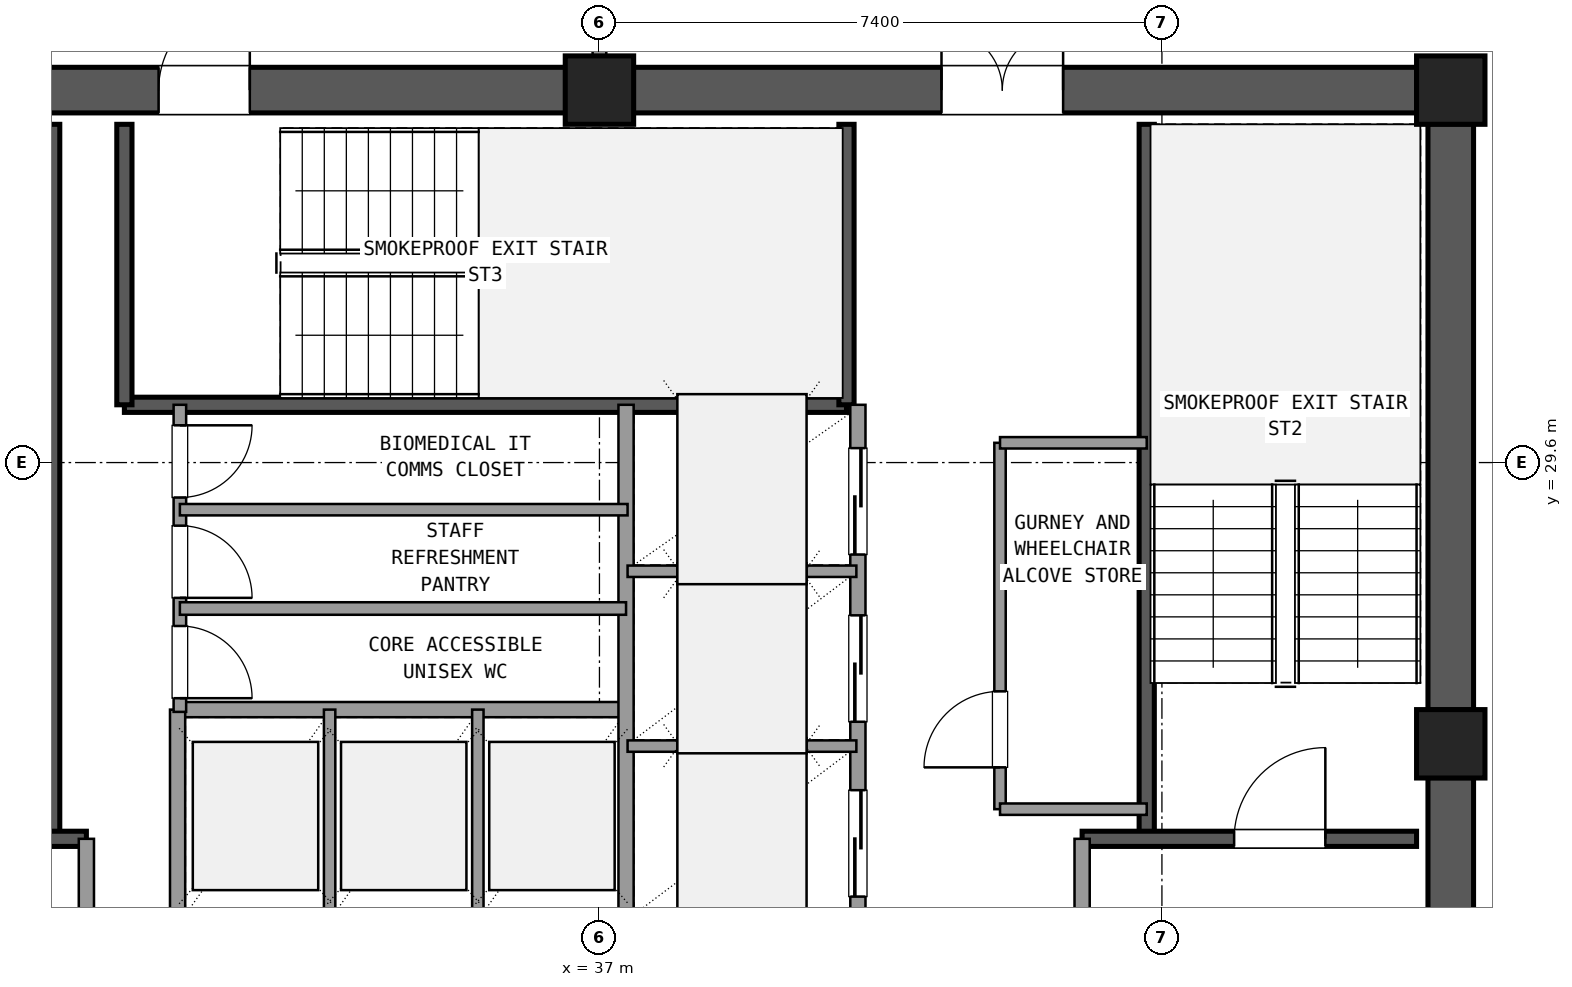
"""IFC4 building model, lengths in metres.
Left out: names, types, materials, properties, quantities, classifications, styles, units other than length and angle.
Written with IfcOpenShell. Run it as: python <this file> out.ifc"""

import sys

from ifc_helpers import new_model, si_unit, direction, frame, frame_2d, origin, origin_2d, place, context, subcontext, project, spatial, rectangle, extrude, element, fill, save


model = new_model("IFC4")
c1 = context("Model", 3, precision=1e-05, world=origin(), true_north=direction((0.0, 1.0)))
c2 = subcontext(c1, "Body", "Model", "MODEL_VIEW")
j1 = project(units=[si_unit("LENGTHUNIT", "METRE"), si_unit("PLANEANGLEUNIT", "RADIAN")], contexts=[c1])
p1 = place(None, origin())
s1 = spatial("IfcSite", under=j1, at=p1, CompositionType="ELEMENT")
p2 = place(p1, origin())
s2 = spatial("IfcBuilding", under=s1, at=p2, CompositionType="ELEMENT")
p3 = place(p2, frame((0.0, 0.0, 242.82)))
s3 = spatial("IfcBuildingStorey", under=s2, at=p3, CompositionType="ELEMENT", Elevation=242.82)
for number, where, z_axis, x_axis in (
    (1, (48.2, 25.9, 0.0), (0.0, 0.0, 1.0), (1.0, 0.0, 0.0)),
    (2, (48.2, 34.5, 0.0), (0.0, 0.0, 1.0), (1.0, 0.0, 0.0)),
    (3, (37.0, 34.5, 0.0), (0.0, 0.0, 1.0), (1.0, 0.0, 0.0)),
):
    element("IfcColumn", number, at=place(p3, frame(where, z_axis=z_axis, x_axis=x_axis)), inside=s3, PredefinedType="COLUMN", context=c2, shape_type="SweptSolid", body=[
        extrude(rectangle(XDim=0.9, YDim=0.9, at=origin_2d()), origin(), (0.0, 0.0, 1.0), 3.6),
    ])
p4 = place(p3, frame((48.2, 17.745, 0.0), z_axis=(0.0, 0.0, 1.0), x_axis=(0.0, 1.0, 0.0)))
e4 = element("IfcWall", 4, at=p4, inside=s3, PredefinedType="SHEAR", context=c2, shape_type="SweptSolid", body=[
    extrude(rectangle(XDim=7.71, YDim=0.6, at=frame_2d((3.855, 0.0))), origin(), (0.0, 0.0, 1.0), 3.32),
])
p5 = place(p4, frame((4.305, 0.0, 0.0)))
e5 = element("IfcOpeningElement", 5, at=p5, cuts=e4, PredefinedType="OPENING", context=c2, shape_type="SweptSolid", body=[
    extrude(rectangle(XDim=1.2, YDim=2.15, at=frame_2d((0.6, 1.075))), frame((0.0, 0.31, 0.0), z_axis=(0.0, -1.0, 0.0), x_axis=(1.0, 0.0, 0.0)), (0.0, 0.0, 1.0), 0.62),
])
p6 = place(p3, frame((48.2, 26.345, 0.0), z_axis=(0.0, 0.0, 1.0), x_axis=(0.0, 1.0, 0.0)))
e6 = element("IfcWall", 6, at=p6, inside=s3, PredefinedType="SHEAR", context=c2, shape_type="SweptSolid", body=[
    extrude(rectangle(XDim=7.71, YDim=0.6, at=frame_2d((3.855, 0.0))), origin(), (0.0, 0.0, 1.0), 3.32),
])
p7 = place(p3, frame((47.755, 34.5, 0.0), z_axis=(0.0, 0.0, 1.0), x_axis=(-1.0, 0.0, 0.0)))
e7 = element("IfcWall", 7, at=p7, inside=s3, PredefinedType="SHEAR", context=c2, shape_type="SweptSolid", body=[
    extrude(rectangle(XDim=10.31, YDim=0.6, at=frame_2d((5.155, 0.0))), origin(), (0.0, 0.0, 1.0), 3.32),
])
p8 = place(p7, frame((4.655, 0.0, 0.0)))
e8 = element("IfcOpeningElement", 8, at=p8, cuts=e7, PredefinedType="OPENING", context=c2, shape_type="SweptSolid", body=[
    extrude(rectangle(XDim=1.6, YDim=2.2, at=frame_2d((0.8, 1.1))), frame((0.0, 0.31, 0.0), z_axis=(0.0, -1.0, 0.0), x_axis=(1.0, 0.0, 0.0)), (0.0, 0.0, 1.0), 0.62),
])
p9 = place(p3, frame((36.555, 34.5, 0.0), z_axis=(0.0, 0.0, 1.0), x_axis=(-1.0, 0.0, 0.0)))
e9 = element("IfcWall", 9, at=p9, inside=s3, PredefinedType="SHEAR", context=c2, shape_type="SweptSolid", body=[
    extrude(rectangle(XDim=10.31, YDim=0.6, at=frame_2d((5.155, 0.0))), origin(), (0.0, 0.0, 1.0), 3.32),
])
p10 = place(p9, frame((4.155, 0.0, 0.0)))
e10 = element("IfcOpeningElement", 10, at=p10, cuts=e9, PredefinedType="OPENING", context=c2, shape_type="SweptSolid", body=[
    extrude(rectangle(XDim=1.2, YDim=2.15, at=frame_2d((0.6, 1.075))), frame((0.0, 0.31, 0.0), z_axis=(0.0, -1.0, 0.0), x_axis=(1.0, 0.0, 0.0)), (0.0, 0.0, 1.0), 0.62),
])
p11 = place(p3, frame((29.8, 24.65, 0.0), z_axis=(0.0, 0.0, 1.0), x_axis=(0.0, 1.0, 0.0)))
e11 = element("IfcWall", 11, at=p11, inside=s3, PredefinedType="SHEAR", context=c2, shape_type="SweptSolid", body=[
    extrude(rectangle(XDim=9.4, YDim=0.2, at=frame_2d((4.7, 0.0))), origin(), (0.0, 0.0, 1.0), 3.32),
])
p12 = place(p3, frame((26.25, 24.65, 0.0), z_axis=(0.0, 0.0, 1.0), x_axis=(1.0, 0.0, 0.0)))
e12 = element("IfcWall", 12, at=p12, inside=s3, PredefinedType="SHEAR", context=c2, shape_type="SweptSolid", body=[
    extrude(rectangle(XDim=4.0, YDim=0.2, at=frame_2d((2.0, 0.0))), origin(), (0.0, 0.0, 1.0), 3.32),
])
p13 = place(p12, frame((1.0, 0.0, 0.0)))
e13 = element("IfcOpeningElement", 13, at=p13, cuts=e12, PredefinedType="OPENING", context=c2, shape_type="SweptSolid", body=[
    extrude(rectangle(XDim=1.2, YDim=2.15, at=frame_2d((0.6, 1.075))), frame((0.0, 0.11, 0.0), z_axis=(0.0, -1.0, 0.0), x_axis=(1.0, 0.0, 0.0)), (0.0, 0.0, 1.0), 0.22),
])
p14 = place(p3, frame((44.2, 24.65, 0.0), z_axis=(0.0, 0.0, 1.0), x_axis=(0.0, 1.0, 0.0)))
e14 = element("IfcWall", 14, at=p14, inside=s3, PredefinedType="SHEAR", context=c2, shape_type="SweptSolid", body=[
    extrude(rectangle(XDim=9.4, YDim=0.2, at=frame_2d((4.7, 0.0))), origin(), (0.0, 0.0, 1.0), 3.32),
])
p15 = place(p3, frame((43.35, 24.65, 0.0), z_axis=(0.0, 0.0, 1.0), x_axis=(1.0, 0.0, 0.0)))
e15 = element("IfcWall", 15, at=p15, inside=s3, PredefinedType="SHEAR", context=c2, shape_type="SweptSolid", body=[
    extrude(rectangle(XDim=4.4, YDim=0.2, at=frame_2d((2.2, 0.0))), origin(), (0.0, 0.0, 1.0), 3.32),
])
p16 = place(p15, frame((2.0, 0.0, 0.0)))
e16 = element("IfcOpeningElement", 16, at=p16, cuts=e15, PredefinedType="OPENING", context=c2, shape_type="SweptSolid", body=[
    extrude(rectangle(XDim=1.2, YDim=2.15, at=frame_2d((0.6, 1.075))), frame((0.0, 0.11, 0.0), z_axis=(0.0, -1.0, 0.0), x_axis=(1.0, 0.0, 0.0)), (0.0, 0.0, 1.0), 0.22),
])
p17 = place(p3, frame((30.75, 30.36, 0.0), z_axis=(0.0, 0.0, 1.0), x_axis=(1.0, 0.0, 0.0)))
e17 = element("IfcWall", 17, at=p17, inside=s3, PredefinedType="SHEAR", context=c2, shape_type="SweptSolid", body=[
    extrude(rectangle(XDim=9.5, YDim=0.2, at=frame_2d((4.75, 0.0))), origin(), (0.0, 0.0, 1.0), 3.32),
])
for number, where, z_axis, x_axis in (
    (18, (30.75, 30.36, 0.0), (0.0, 0.0, 1.0), (0.0, 1.0, 0.0)),
    (19, (40.25, 30.36, 0.0), (0.0, 0.0, 1.0), (0.0, 1.0, 0.0)),
):
    element("IfcWall", number, at=place(p3, frame(where, z_axis=z_axis, x_axis=x_axis)), inside=s3, PredefinedType="SHEAR", context=c2, shape_type="SweptSolid", body=[
        extrude(rectangle(XDim=3.69, YDim=0.2, at=frame_2d((1.845, 0.0))), origin(), (0.0, 0.0, 1.0), 3.32),
    ])
p18 = place(p3, frame((30.25, 17.75, 0.0), z_axis=(0.0, 0.0, 1.0), x_axis=(0.0, 1.0, 0.0)))
e20 = element("IfcWall", 20, at=p18, inside=s3, PredefinedType="SOLIDWALL", context=c2, shape_type="SweptSolid", body=[
    extrude(rectangle(XDim=6.9, YDim=0.2, at=frame_2d((3.45, 0.0))), origin(), (0.0, 0.0, 1.0), 2.61),
])
p19 = place(p18, frame((4.15, 0.0, 0.0)))
e21 = element("IfcOpeningElement", 21, at=p19, cuts=e20, PredefinedType="OPENING", context=c2, shape_type="SweptSolid", body=[
    extrude(rectangle(XDim=1.2, YDim=2.15, at=frame_2d((0.6, 1.075))), frame((0.0, 0.11, 0.0), z_axis=(0.0, -1.0, 0.0), x_axis=(1.0, 0.0, 0.0)), (0.0, 0.0, 1.0), 0.22),
])
p20 = place(p3, frame((43.35, 17.75, 0.0), z_axis=(0.0, 0.0, 1.0), x_axis=(0.0, 1.0, 0.0)))
e22 = element("IfcWall", 22, at=p20, inside=s3, PredefinedType="SOLIDWALL", context=c2, shape_type="SweptSolid", body=[
    extrude(rectangle(XDim=6.9, YDim=0.2, at=frame_2d((3.45, 0.0))), origin(), (0.0, 0.0, 1.0), 2.61),
])
p21 = place(p20, frame((4.15, 0.0, 0.0)))
e23 = element("IfcOpeningElement", 23, at=p21, cuts=e22, PredefinedType="OPENING", context=c2, shape_type="SweptSolid", body=[
    extrude(rectangle(XDim=1.2, YDim=2.15, at=frame_2d((0.6, 1.075))), frame((0.0, 0.11, 0.0), z_axis=(0.0, -1.0, 0.0), x_axis=(1.0, 0.0, 0.0)), (0.0, 0.0, 1.0), 0.22),
])
p22 = place(p3, frame((31.45, 26.35, 0.0), z_axis=(0.0, 0.0, 1.0), x_axis=(1.0, 0.0, 0.0)))
e24 = element("IfcWall", 24, at=p22, inside=s3, PredefinedType="SOLIDWALL", context=c2, shape_type="SweptSolid", body=[
    extrude(rectangle(XDim=5.9, YDim=0.2, at=frame_2d((2.95, 0.0))), origin(), (0.0, 0.0, 1.0), 2.61),
])
p23 = place(p3, frame((31.45, 23.54, 0.0), z_axis=(0.0, 0.0, 1.0), x_axis=(0.0, 1.0, 0.0)))
e25 = element("IfcWall", 25, at=p23, inside=s3, PredefinedType="SOLIDWALL", context=c2, shape_type="SweptSolid", body=[
    extrude(rectangle(XDim=2.81, YDim=0.2, at=frame_2d((1.405, 0.0))), origin(), (0.0, 0.0, 1.0), 2.61),
])
for number, where, z_axis, x_axis in (
    (26, (33.45, 23.54, 0.0), (0.0, 0.0, 1.0), (0.0, 1.0, 0.0)),
    (27, (35.4, 23.54, 0.0), (0.0, 0.0, 1.0), (0.0, 1.0, 0.0)),
):
    element("IfcWall", number, at=place(p3, frame(where, z_axis=z_axis, x_axis=x_axis)), inside=s3, PredefinedType="PARTITIONING", context=c2, shape_type="SweptSolid", body=[
        extrude(rectangle(XDim=2.81, YDim=0.15, at=frame_2d((1.405, 0.0))), origin(), (0.0, 0.0, 1.0), 2.61),
    ])
p24 = place(p3, frame((37.35, 23.54, 0.0), z_axis=(0.0, 0.0, 1.0), x_axis=(0.0, 1.0, 0.0)))
e28 = element("IfcWall", 28, at=p24, inside=s3, PredefinedType="SOLIDWALL", context=c2, shape_type="SweptSolid", body=[
    extrude(rectangle(XDim=6.82, YDim=0.2, at=frame_2d((3.41, 0.0))), origin(), (0.0, 0.0, 1.0), 2.61),
])
p25 = place(p3, frame((40.4, 23.54, 0.0), z_axis=(0.0, 0.0, 1.0), x_axis=(0.0, 1.0, 0.0)))
e29 = element("IfcWall", 29, at=p25, inside=s3, PredefinedType="SOLIDWALL", context=c2, shape_type="SweptSolid", body=[
    extrude(rectangle(XDim=6.82, YDim=0.2, at=frame_2d((3.41, 0.0))), origin(), (0.0, 0.0, 1.0), 2.61),
])
p26 = place(p25, frame((0.35, 0.0, 0.0)))
e30 = element("IfcOpeningElement", 30, at=p26, cuts=e29, PredefinedType="OPENING", context=c2, shape_type="SweptSolid", body=[
    extrude(rectangle(XDim=1.4, YDim=2.2, at=frame_2d((0.7, 1.1))), frame((0.0, 0.11, 0.0), z_axis=(0.0, -1.0, 0.0), x_axis=(1.0, 0.0, 0.0)), (0.0, 0.0, 1.0), 0.22),
])
p27 = place(p25, frame((2.65, 0.0, 0.0)))
e31 = element("IfcOpeningElement", 31, at=p27, cuts=e29, PredefinedType="OPENING", context=c2, shape_type="SweptSolid", body=[
    extrude(rectangle(XDim=1.4, YDim=2.2, at=frame_2d((0.7, 1.1))), frame((0.0, 0.11, 0.0), z_axis=(0.0, -1.0, 0.0), x_axis=(1.0, 0.0, 0.0)), (0.0, 0.0, 1.0), 0.22),
])
p28 = place(p25, frame((4.85, 0.0, 0.0)))
e32 = element("IfcOpeningElement", 32, at=p28, cuts=e29, PredefinedType="OPENING", context=c2, shape_type="SweptSolid", body=[
    extrude(rectangle(XDim=1.4, YDim=2.2, at=frame_2d((0.7, 1.1))), frame((0.0, 0.11, 0.0), z_axis=(0.0, -1.0, 0.0), x_axis=(1.0, 0.0, 0.0)), (0.0, 0.0, 1.0), 0.22),
])
for number, where, z_axis, x_axis in (
    (33, (37.37, 25.87, 0.0), (0.0, 0.0, 1.0), (1.0, 0.0, 0.0)),
    (34, (37.37, 28.17, 0.0), (0.0, 0.0, 1.0), (1.0, 0.0, 0.0)),
):
    element("IfcWall", number, at=place(p3, frame(where, z_axis=z_axis, x_axis=x_axis)), inside=s3, PredefinedType="PARTITIONING", context=c2, shape_type="SweptSolid", body=[
        extrude(rectangle(XDim=3.01, YDim=0.15, at=frame_2d((1.505, 0.0))), origin(), (0.0, 0.0, 1.0), 2.61),
    ])
p29 = place(p3, frame((42.27, 25.04, 0.0), z_axis=(0.0, 0.0, 1.0), x_axis=(0.0, 1.0, 0.0)))
e35 = element("IfcWall", 35, at=p29, inside=s3, PredefinedType="PARTITIONING", context=c2, shape_type="SweptSolid", body=[
    extrude(rectangle(XDim=4.82, YDim=0.15, at=frame_2d((2.41, 0.0))), origin(), (0.0, 0.0, 1.0), 2.61),
])
p30 = place(p29, frame((0.55, 0.0, 0.0)))
e36 = element("IfcOpeningElement", 36, at=p30, cuts=e35, PredefinedType="OPENING", context=c2, shape_type="SweptSolid", body=[
    extrude(rectangle(XDim=1.0, YDim=2.15, at=frame_2d((0.5, 1.075))), frame((0.0, 0.085, 0.0), z_axis=(0.0, -1.0, 0.0), x_axis=(1.0, 0.0, 0.0)), (0.0, 0.0, 1.0), 0.17),
])
for number, where, z_axis, x_axis in (
    (37, (42.27, 25.04, 0.0), (0.0, 0.0, 1.0), (1.0, 0.0, 0.0)),
    (38, (42.27, 29.86, 0.0), (0.0, 0.0, 1.0), (1.0, 0.0, 0.0)),
):
    element("IfcWall", number, at=place(p3, frame(where, z_axis=z_axis, x_axis=x_axis)), inside=s3, PredefinedType="PARTITIONING", context=c2, shape_type="SweptSolid", body=[
        extrude(rectangle(XDim=1.93, YDim=0.15, at=frame_2d((0.965, 0.0))), origin(), (0.0, 0.0, 1.0), 2.61),
    ])
p31 = place(p3, frame((31.48, 26.32, 0.0), z_axis=(0.0, 0.0, 1.0), x_axis=(0.0, 1.0, 0.0)))
e39 = element("IfcWall", 39, at=p31, inside=s3, PredefinedType="PLUMBINGWALL", context=c2, shape_type="SweptSolid", body=[
    extrude(rectangle(XDim=4.04, YDim=0.165, at=frame_2d((2.02, 0.0))), origin(), (0.0, 0.0, 1.0), 2.61),
])
p32 = place(p31, frame((0.18, 0.0, 0.0)))
e40 = element("IfcOpeningElement", 40, at=p32, cuts=e39, PredefinedType="OPENING", context=c2, shape_type="SweptSolid", body=[
    extrude(rectangle(XDim=0.95, YDim=2.1, at=frame_2d((0.475, 1.05))), frame((0.0, 0.093, 0.0), z_axis=(0.0, -1.0, 0.0), x_axis=(1.0, 0.0, 0.0)), (0.0, 0.0, 1.0), 0.185),
])
p33 = place(p31, frame((1.5, 0.0, 0.0)))
e41 = element("IfcOpeningElement", 41, at=p33, cuts=e39, PredefinedType="OPENING", context=c2, shape_type="SweptSolid", body=[
    extrude(rectangle(XDim=0.95, YDim=2.1, at=frame_2d((0.475, 1.05))), frame((0.0, 0.093, 0.0), z_axis=(0.0, -1.0, 0.0), x_axis=(1.0, 0.0, 0.0)), (0.0, 0.0, 1.0), 0.185),
])
p34 = place(p31, frame((2.82, 0.0, 0.0)))
e42 = element("IfcOpeningElement", 42, at=p34, cuts=e39, PredefinedType="OPENING", context=c2, shape_type="SweptSolid", body=[
    extrude(rectangle(XDim=0.95, YDim=2.1, at=frame_2d((0.475, 1.05))), frame((0.0, 0.093, 0.0), z_axis=(0.0, -1.0, 0.0), x_axis=(1.0, 0.0, 0.0)), (0.0, 0.0, 1.0), 0.185),
])
p35 = place(p3, frame((31.48, 27.68, 0.0), z_axis=(0.0, 0.0, 1.0), x_axis=(1.0, 0.0, 0.0)))
e43 = element("IfcWall", 43, at=p35, inside=s3, PredefinedType="PLUMBINGWALL", context=c2, shape_type="SweptSolid", body=[
    extrude(rectangle(XDim=5.87, YDim=0.165, at=frame_2d((2.935, 0.0))), origin(), (0.0, 0.0, 1.0), 2.61),
])
p36 = place(p3, frame((31.48, 28.98, 0.0), z_axis=(0.0, 0.0, 1.0), x_axis=(1.0, 0.0, 0.0)))
e44 = element("IfcWall", 44, at=p36, inside=s3, PredefinedType="PARTITIONING", context=c2, shape_type="SweptSolid", body=[
    extrude(rectangle(XDim=5.89, YDim=0.15, at=frame_2d((2.945, 0.0))), origin(), (0.0, 0.0, 1.0), 2.61),
])
p37 = place(p3, frame((37.0, 34.95, 0.0), z_axis=(0.0, 0.0, 1.0), x_axis=(0.0, 1.0, 0.0)))
e45 = element("IfcWall", 45, at=p37, inside=s3, PredefinedType="PARTITIONING", context=c2, shape_type="SweptSolid", body=[
    extrude(rectangle(XDim=2.7, YDim=0.18, at=frame_2d((1.35, 0.0))), origin(), (0.0, 0.0, 1.0), 2.61),
])
p38 = place(p37, frame((0.35, 0.0, 0.0)))
e46 = element("IfcOpeningElement", 46, at=p38, cuts=e45, PredefinedType="OPENING", context=c2, shape_type="SweptSolid", body=[
    extrude(rectangle(XDim=2.0, YDim=2.2, at=frame_2d((1.0, 1.1))), frame((0.0, 0.1, 0.0), z_axis=(0.0, -1.0, 0.0), x_axis=(1.0, 0.0, 0.0)), (0.0, 0.0, 1.0), 0.2),
])
p39 = place(p16, origin())
e47 = element("IfcDoor", 47, at=p39, inside=s3, OperationType="SINGLE_SWING_RIGHT", PredefinedType="DOOR", context=c2, shape_type="SweptSolid", body=[
    extrude(rectangle(XDim=1.2, YDim=2.15, at=frame_2d((0.6, 1.075))), frame((0.0, 0.025, 0.0), z_axis=(0.0, -1.0, 0.0), x_axis=(1.0, 0.0, 0.0)), (0.0, 0.0, 1.0), 0.05),
])
fill(e16, e47)
p40 = place(p8, frame((1.6, 0.0, 0.0), z_axis=(0.0, 0.0, 1.0), x_axis=(-1.0, 0.0, 0.0)))
e48 = element("IfcDoor", 48, at=p40, inside=s3, OperationType="DOUBLE_DOOR_SINGLE_SWING", PredefinedType="DOOR", context=c2, shape_type="SweptSolid", body=[
    extrude(rectangle(XDim=1.6, YDim=2.2, at=frame_2d((0.8, 1.1))), frame((0.0, 0.025, 0.0), z_axis=(0.0, -1.0, 0.0), x_axis=(1.0, 0.0, 0.0)), (0.0, 0.0, 1.0), 0.05),
])
fill(e8, e48)
p41 = place(p10, frame((1.2, 0.0, 0.0), z_axis=(0.0, 0.0, 1.0), x_axis=(-1.0, 0.0, 0.0)))
e49 = element("IfcDoor", 49, at=p41, inside=s3, OperationType="SINGLE_SWING_LEFT", PredefinedType="DOOR", context=c2, shape_type="SweptSolid", body=[
    extrude(rectangle(XDim=1.2, YDim=2.15, at=frame_2d((0.6, 1.075))), frame((0.0, 0.025, 0.0), z_axis=(0.0, -1.0, 0.0), x_axis=(1.0, 0.0, 0.0)), (0.0, 0.0, 1.0), 0.05),
])
fill(e10, e49)
p42 = place(p26, origin())
e50 = element("IfcDoor", 50, at=p42, inside=s3, OperationType="SLIDING_TO_LEFT", PredefinedType="DOOR", context=c2, shape_type="SweptSolid", body=[
    extrude(rectangle(XDim=1.4, YDim=2.2, at=frame_2d((0.7, 1.1))), frame((0.0, 0.025, 0.0), z_axis=(0.0, -1.0, 0.0), x_axis=(1.0, 0.0, 0.0)), (0.0, 0.0, 1.0), 0.05),
])
fill(e30, e50)
p43 = place(p27, origin())
e51 = element("IfcDoor", 51, at=p43, inside=s3, OperationType="SLIDING_TO_LEFT", PredefinedType="DOOR", context=c2, shape_type="SweptSolid", body=[
    extrude(rectangle(XDim=1.4, YDim=2.2, at=frame_2d((0.7, 1.1))), frame((0.0, 0.025, 0.0), z_axis=(0.0, -1.0, 0.0), x_axis=(1.0, 0.0, 0.0)), (0.0, 0.0, 1.0), 0.05),
])
fill(e31, e51)
p44 = place(p28, origin())
e52 = element("IfcDoor", 52, at=p44, inside=s3, OperationType="SLIDING_TO_RIGHT", PredefinedType="DOOR", context=c2, shape_type="SweptSolid", body=[
    extrude(rectangle(XDim=1.4, YDim=2.2, at=frame_2d((0.7, 1.1))), frame((0.0, 0.025, 0.0), z_axis=(0.0, -1.0, 0.0), x_axis=(1.0, 0.0, 0.0)), (0.0, 0.0, 1.0), 0.05),
])
fill(e32, e52)
p45 = place(p30, origin())
e53 = element("IfcDoor", 53, at=p45, inside=s3, OperationType="SINGLE_SWING_LEFT", PredefinedType="DOOR", context=c2, shape_type="SweptSolid", body=[
    extrude(rectangle(XDim=1.0, YDim=2.15, at=frame_2d((0.5, 1.075))), frame((0.0, 0.025, 0.0), z_axis=(0.0, -1.0, 0.0), x_axis=(1.0, 0.0, 0.0)), (0.0, 0.0, 1.0), 0.05),
])
fill(e36, e53)
p46 = place(p32, frame((0.95, 0.0, 0.0), z_axis=(0.0, 0.0, 1.0), x_axis=(-1.0, 0.0, 0.0)))
e54 = element("IfcDoor", 54, at=p46, inside=s3, OperationType="SINGLE_SWING_LEFT", PredefinedType="DOOR", context=c2, shape_type="SweptSolid", body=[
    extrude(rectangle(XDim=0.95, YDim=2.1, at=frame_2d((0.475, 1.05))), frame((0.0, 0.025, 0.0), z_axis=(0.0, -1.0, 0.0), x_axis=(1.0, 0.0, 0.0)), (0.0, 0.0, 1.0), 0.05),
])
fill(e40, e54)
p47 = place(p33, frame((0.95, 0.0, 0.0), z_axis=(0.0, 0.0, 1.0), x_axis=(-1.0, 0.0, 0.0)))
e55 = element("IfcDoor", 55, at=p47, inside=s3, OperationType="SINGLE_SWING_LEFT", PredefinedType="DOOR", context=c2, shape_type="SweptSolid", body=[
    extrude(rectangle(XDim=0.95, YDim=2.1, at=frame_2d((0.475, 1.05))), frame((0.0, 0.025, 0.0), z_axis=(0.0, -1.0, 0.0), x_axis=(1.0, 0.0, 0.0)), (0.0, 0.0, 1.0), 0.05),
])
fill(e41, e55)
p48 = place(p34, frame((0.95, 0.0, 0.0), z_axis=(0.0, 0.0, 1.0), x_axis=(-1.0, 0.0, 0.0)))
e56 = element("IfcDoor", 56, at=p48, inside=s3, OperationType="SINGLE_SWING_RIGHT", PredefinedType="DOOR", context=c2, shape_type="SweptSolid", body=[
    extrude(rectangle(XDim=0.95, YDim=2.1, at=frame_2d((0.475, 1.05))), frame((0.0, 0.025, 0.0), z_axis=(0.0, -1.0, 0.0), x_axis=(1.0, 0.0, 0.0)), (0.0, 0.0, 1.0), 0.05),
])
fill(e42, e56)
save(model, sys.argv[1])
